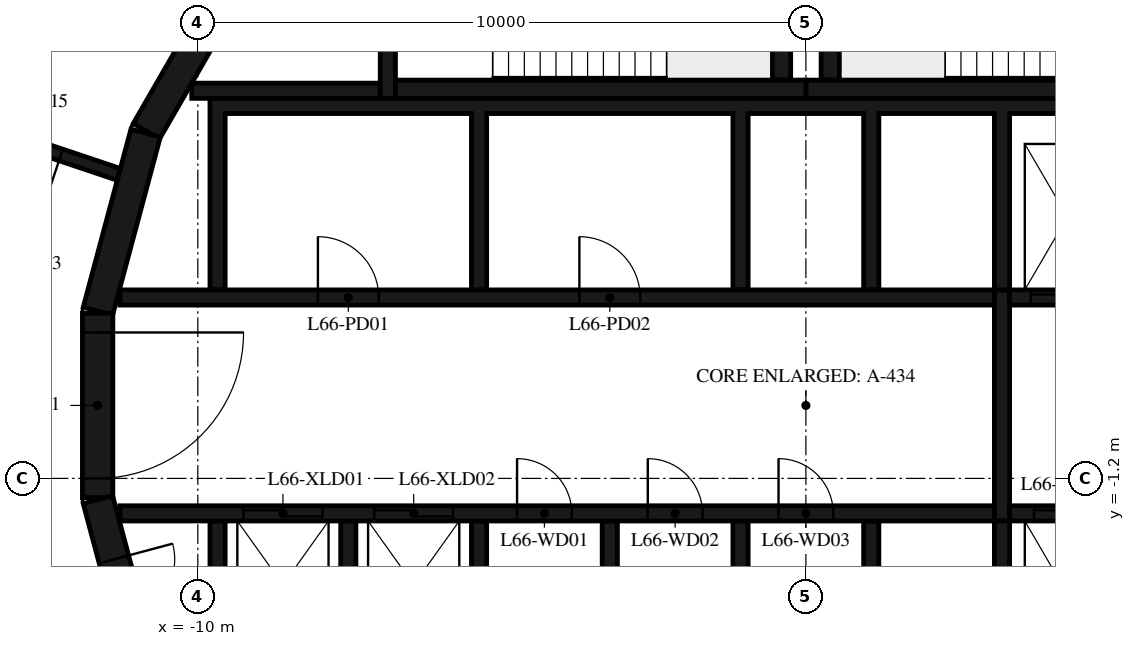
"""IFC4 building model, lengths in metres.
Left out: names, types, materials, properties, quantities, classifications, styles, units other than length and angle.
Written with IfcOpenShell. Run it as: python <this file> out.ifc"""

import sys

from ifc_helpers import new_model, si_unit, direction, frame, frame_2d, origin, place, context, subcontext, project, spatial, polyline, rectangle, outline, extrude, element, fill, save


model = new_model("IFC4")
c1 = context("Model", 3, precision=1e-05, world=origin(), true_north=direction((0.0, 1.0)))
c2 = subcontext(c1, "Body", "Model", "MODEL_VIEW")
j1 = project(units=[si_unit("LENGTHUNIT", "METRE"), si_unit("PLANEANGLEUNIT", "RADIAN")], contexts=[c1])
p1 = place(None, origin())
s1 = spatial("IfcSite", under=j1, at=p1, CompositionType="ELEMENT")
p2 = place(p1, origin())
s2 = spatial("IfcBuilding", under=s1, at=p2, CompositionType="ELEMENT")
p3 = place(p2, frame((0.0, 0.0, 258.2)))
s3 = spatial("IfcBuildingStorey", under=s2, at=p3, CompositionType="ELEMENT", Elevation=258.2)
for number, where, z_axis, x_axis in (
    (1, (-9.329, 7.137, 0.0), (0.0, 0.0, 1.0), (-0.5, -0.866, 0.0)),
    (2, (-10.858, 4.479, 0.0), (0.0, 0.0, 1.0), (-0.259, -0.966, 0.0)),
):
    element("IfcWall", number, at=place(p3, frame(where, z_axis=z_axis, x_axis=x_axis)), inside=s3, PredefinedType="SHEAR", context=c2, shape_type="SweptSolid", body=[
        extrude(rectangle(XDim=3.033, YDim=0.5, at=frame_2d((1.516, 0.0))), origin(), (0.0, 0.0, 1.0), 4.75),
    ])
p4 = place(p3, frame((-11.647, 1.516, 0.0), z_axis=(0.0, 0.0, 1.0), x_axis=(0.0, -1.0, 0.0)))
e3 = element("IfcWall", 3, at=p4, inside=s3, PredefinedType="SHEAR", context=c2, shape_type="SweptSolid", body=[
    extrude(rectangle(XDim=3.033, YDim=0.5, at=frame_2d((1.516, 0.0))), origin(), (0.0, 0.0, 1.0), 4.75),
])
p5 = place(p4, frame((0.316, 0.0, 0.0)))
e4 = element("IfcOpeningElement", 4, at=p5, cuts=e3, PredefinedType="OPENING", context=c2, shape_type="SweptSolid", body=[
    extrude(rectangle(XDim=2.4, YDim=2.1, at=frame_2d((1.2, 1.05))), frame((0.0, 0.26, 0.0), z_axis=(0.0, -1.0, 0.0), x_axis=(1.0, 0.0, 0.0)), (0.0, 0.0, 1.0), 0.52),
])
p6 = place(p3, frame((-11.643, -1.55, 0.0), z_axis=(0.0, 0.0, 1.0), x_axis=(0.258734743916, -0.965948410781, 0.0)))
e5 = element("IfcWall", 5, at=p6, inside=s3, PredefinedType="SHEAR", context=c2, shape_type="SweptSolid", body=[
    extrude(rectangle(XDim=3.033, YDim=0.5, at=frame_2d((1.516, 0.0))), origin(), (0.0, 0.0, 1.0), 4.75),
])
p7 = place(p6, frame((1.016, 0.0, 0.0)))
e6 = element("IfcOpeningElement", 6, at=p7, cuts=e5, PredefinedType="OPENING", context=c2, shape_type="SweptSolid", body=[
    extrude(rectangle(XDim=1.0, YDim=2.4, at=frame_2d((0.5, 1.2))), frame((0.0, 0.26, 0.0), z_axis=(0.0, -1.0, 0.0), x_axis=(1.0, 0.0, 0.0)), (0.0, 0.0, 1.0), 0.52),
])
p8 = place(p3, frame((0.0, 5.2, 0.0), z_axis=(0.0, 0.0, 1.0), x_axis=(1.0, 0.0, 0.0)))
e7 = element("IfcWall", 7, at=p8, inside=s3, PredefinedType="SHEAR", context=c2, shape_type="SweptSolid", body=[
    extrude(rectangle(XDim=6.75, YDim=0.3, at=frame_2d((3.375, 0.0))), origin(), (0.0, 0.0, 1.0), 4.75),
])
p9 = place(p3, frame((0.4, 5.35, 0.0), z_axis=(0.0, 0.0, 1.0), x_axis=(0.0, 1.0, 0.0)))
e8 = element("IfcWall", 8, at=p9, inside=s3, PredefinedType="SHEAR", context=c2, shape_type="SweptSolid", body=[
    extrude(rectangle(XDim=3.32, YDim=0.3, at=frame_2d((1.66, 0.0))), origin(), (0.0, 0.0, 1.0), 4.75),
])
p10 = place(p3, frame((-6.75, 5.2, 0.0), z_axis=(0.0, 0.0, 1.0), x_axis=(1.0, 0.0, 0.0)))
e9 = element("IfcWall", 9, at=p10, inside=s3, PredefinedType="SHEAR", context=c2, shape_type="SweptSolid", body=[
    extrude(rectangle(XDim=6.75, YDim=0.3, at=frame_2d((3.375, 0.0))), origin(), (0.0, 0.0, 1.0), 4.75),
])
p11 = place(p3, frame((-0.4, 5.35, 0.0), z_axis=(0.0, 0.0, 1.0), x_axis=(0.0, 1.0, 0.0)))
e10 = element("IfcWall", 10, at=p11, inside=s3, PredefinedType="SHEAR", context=c2, shape_type="SweptSolid", body=[
    extrude(rectangle(XDim=3.32, YDim=0.3, at=frame_2d((1.66, 0.0))), origin(), (0.0, 0.0, 1.0), 4.75),
])
p12 = place(p3, frame((-6.875, 8.97, 0.0), z_axis=(0.0, 0.0, 1.0), x_axis=(0.0, -1.0, 0.0)))
e11 = element("IfcWall", 11, at=p12, inside=s3, PredefinedType="SHEAR", context=c2, shape_type="SweptSolid", body=[
    extrude(rectangle(XDim=3.92, YDim=0.25, at=frame_2d((1.96, 0.0))), origin(), (0.0, 0.0, 1.0), 4.75),
])
p13 = place(p12, frame((1.61, 0.0, 0.0)))
e12 = element("IfcOpeningElement", 12, at=p13, cuts=e11, PredefinedType="OPENING", context=c2, shape_type="SweptSolid", body=[
    extrude(rectangle(XDim=1.2, YDim=2.1, at=frame_2d((0.6, 1.05))), frame((0.0, 0.135, 0.0), z_axis=(0.0, -1.0, 0.0), x_axis=(1.0, 0.0, 0.0)), (0.0, 0.0, 1.0), 0.27),
])
p14 = place(p3, frame((-7.0, 5.175, 0.0), z_axis=(0.0, 0.0, 1.0), x_axis=(-1.0, 0.0, 0.0)))
e13 = element("IfcWall", 13, at=p14, inside=s3, PredefinedType="SHEAR", context=c2, shape_type="SweptSolid", body=[
    extrude(rectangle(XDim=3.1, YDim=0.25, at=frame_2d((1.55, 0.0))), origin(), (0.0, 0.0, 1.0), 4.75),
])
p15 = place(p3, origin())
e14 = element("IfcWall", 14, at=p15, inside=s3, PredefinedType="SHEAR", context=c2, shape_type="SweptSolid", body=[
    extrude(outline(polyline([(-9.55, 4.8), (-5.5, 4.8), (-5.5, 1.9), (-5.25, 1.9), (-5.25, 4.8), (-1.2, 4.8), (-1.2, 1.9), (-0.95, 1.9), (-0.95, 4.8), (0.95, 4.8), (0.95, 1.9), (1.2, 1.9), (1.2, 4.8), (3.1, 4.8), (3.1, 1.9), (3.35, 1.9), (3.35, 4.8), (5.25, 4.8), (5.25, 1.9), (5.5, 1.9), (5.5, 4.8), (7.4, 4.8), (7.4, 1.9), (7.65, 1.9), (7.65, 4.8), (9.55, 4.8), (9.55, 1.9), (9.8, 1.9), (9.8, 4.8), (9.8, 5.05), (-9.8, 5.05), (-9.8, 4.8), (-9.8, 1.9), (-9.55, 1.9), (-9.55, 4.8)])), origin(), (0.0, 0.0, 1.0), 4.75),
])
p16 = place(p3, origin())
e15 = element("IfcWall", 15, at=p16, inside=s3, PredefinedType="SHEAR", context=c2, shape_type="SweptSolid", body=[
    extrude(outline(polyline([(9.8, -5.05), (9.8, -4.8), (9.8, -1.9), (9.55, -1.9), (9.55, -4.8), (7.65, -4.8), (7.65, -1.9), (7.4, -1.9), (7.4, -4.8), (5.5, -4.8), (5.5, -1.9), (5.25, -1.9), (5.25, -4.8), (3.35, -4.8), (3.35, -1.9), (3.1, -1.9), (3.1, -4.8), (1.2, -4.8), (1.2, -1.9), (0.95, -1.9), (0.95, -4.8), (-0.95, -4.8), (-0.95, -1.9), (-1.2, -1.9), (-1.2, -4.8), (-3.1, -4.8), (-3.1, -1.9), (-3.35, -1.9), (-3.35, -4.8), (-5.25, -4.8), (-5.25, -1.9), (-5.5, -1.9), (-5.5, -4.8), (-7.4, -4.8), (-7.4, -1.9), (-7.65, -1.9), (-7.65, -4.8), (-9.55, -4.8), (-9.55, -1.9), (-9.8, -1.9), (-9.8, -4.8), (-9.8, -5.05), (9.8, -5.05)])), origin(), (0.0, 0.0, 1.0), 4.75),
])
p17 = place(p3, frame((-11.28, 1.775, 0.0), z_axis=(0.0, 0.0, 1.0), x_axis=(1.0, 0.0, 0.0)))
e16 = element("IfcWall", 16, at=p17, inside=s3, PredefinedType="SHEAR", context=c2, shape_type="SweptSolid", body=[
    extrude(rectangle(XDim=14.38, YDim=0.25, at=frame_2d((7.19, 0.0))), origin(), (0.0, 0.0, 1.0), 4.75),
])
p18 = place(p17, frame((3.255, 0.0, 0.0)))
e17 = element("IfcOpeningElement", 17, at=p18, cuts=e16, PredefinedType="OPENING", context=c2, shape_type="SweptSolid", body=[
    extrude(rectangle(XDim=1.0, YDim=2.4, at=frame_2d((0.5, 1.2))), frame((0.0, 0.135, 0.0), z_axis=(0.0, -1.0, 0.0), x_axis=(1.0, 0.0, 0.0)), (0.0, 0.0, 1.0), 0.27),
])
p19 = place(p17, frame((7.555, 0.0, 0.0)))
e18 = element("IfcOpeningElement", 18, at=p19, cuts=e16, PredefinedType="OPENING", context=c2, shape_type="SweptSolid", body=[
    extrude(rectangle(XDim=1.0, YDim=2.4, at=frame_2d((0.5, 1.2))), frame((0.0, 0.135, 0.0), z_axis=(0.0, -1.0, 0.0), x_axis=(1.0, 0.0, 0.0)), (0.0, 0.0, 1.0), 0.27),
])
p20 = place(p3, frame((3.35, 1.775, 0.0), z_axis=(0.0, 0.0, 1.0), x_axis=(1.0, 0.0, 0.0)))
e19 = element("IfcWall", 19, at=p20, inside=s3, PredefinedType="SHEAR", context=c2, shape_type="SweptSolid", body=[
    extrude(rectangle(XDim=7.93, YDim=0.25, at=frame_2d((3.965, 0.0))), origin(), (0.0, 0.0, 1.0), 4.75),
])
p21 = place(p20, frame((0.35, 0.0, 0.0)))
e20 = element("IfcOpeningElement", 20, at=p21, cuts=e19, PredefinedType="OPENING", context=c2, shape_type="SweptSolid", body=[
    extrude(rectangle(XDim=1.2, YDim=2.4, at=frame_2d((0.6, 1.2))), frame((0.0, 0.135, 0.0), z_axis=(0.0, -1.0, 0.0), x_axis=(1.0, 0.0, 0.0)), (0.0, 0.0, 1.0), 0.27),
])
p22 = place(p20, frame((2.5, 0.0, 0.0)))
e21 = element("IfcOpeningElement", 21, at=p22, cuts=e19, PredefinedType="OPENING", context=c2, shape_type="SweptSolid", body=[
    extrude(rectangle(XDim=1.2, YDim=2.4, at=frame_2d((0.6, 1.2))), frame((0.0, 0.135, 0.0), z_axis=(0.0, -1.0, 0.0), x_axis=(1.0, 0.0, 0.0)), (0.0, 0.0, 1.0), 0.27),
])
p23 = place(p20, frame((4.75, 0.0, 0.0)))
e22 = element("IfcOpeningElement", 22, at=p23, cuts=e19, PredefinedType="OPENING", context=c2, shape_type="SweptSolid", body=[
    extrude(rectangle(XDim=1.0, YDim=2.4, at=frame_2d((0.5, 1.2))), frame((0.0, 0.135, 0.0), z_axis=(0.0, -1.0, 0.0), x_axis=(1.0, 0.0, 0.0)), (0.0, 0.0, 1.0), 0.27),
])
p24 = place(p3, frame((-11.28, -1.775, 0.0), z_axis=(0.0, 0.0, 1.0), x_axis=(1.0, 0.0, 0.0)))
e23 = element("IfcWall", 23, at=p24, inside=s3, PredefinedType="SHEAR", context=c2, shape_type="SweptSolid", body=[
    extrude(rectangle(XDim=14.38, YDim=0.25, at=frame_2d((7.19, 0.0))), origin(), (0.0, 0.0, 1.0), 4.75),
])
p25 = place(p24, frame((2.03, 0.0, 0.0)))
e24 = element("IfcOpeningElement", 24, at=p25, cuts=e23, PredefinedType="OPENING", context=c2, shape_type="SweptSolid", body=[
    extrude(rectangle(XDim=1.3, YDim=2.1, at=frame_2d((0.65, 1.05))), frame((0.0, 0.135, 0.0), z_axis=(0.0, -1.0, 0.0), x_axis=(1.0, 0.0, 0.0)), (0.0, 0.0, 1.0), 0.27),
])
p26 = place(p24, frame((4.18, 0.0, 0.0)))
e25 = element("IfcOpeningElement", 25, at=p26, cuts=e23, PredefinedType="OPENING", context=c2, shape_type="SweptSolid", body=[
    extrude(rectangle(XDim=1.3, YDim=2.1, at=frame_2d((0.65, 1.05))), frame((0.0, 0.135, 0.0), z_axis=(0.0, -1.0, 0.0), x_axis=(1.0, 0.0, 0.0)), (0.0, 0.0, 1.0), 0.27),
])
p27 = place(p24, frame((6.53, 0.0, 0.0)))
e26 = element("IfcOpeningElement", 26, at=p27, cuts=e23, PredefinedType="OPENING", context=c2, shape_type="SweptSolid", body=[
    extrude(rectangle(XDim=0.9, YDim=2.1, at=frame_2d((0.45, 1.05))), frame((0.0, 0.135, 0.0), z_axis=(0.0, -1.0, 0.0), x_axis=(1.0, 0.0, 0.0)), (0.0, 0.0, 1.0), 0.27),
])
p28 = place(p24, frame((8.68, 0.0, 0.0)))
e27 = element("IfcOpeningElement", 27, at=p28, cuts=e23, PredefinedType="OPENING", context=c2, shape_type="SweptSolid", body=[
    extrude(rectangle(XDim=0.9, YDim=2.1, at=frame_2d((0.45, 1.05))), frame((0.0, 0.135, 0.0), z_axis=(0.0, -1.0, 0.0), x_axis=(1.0, 0.0, 0.0)), (0.0, 0.0, 1.0), 0.27),
])
p29 = place(p24, frame((10.83, 0.0, 0.0)))
e28 = element("IfcOpeningElement", 28, at=p29, cuts=e23, PredefinedType="OPENING", context=c2, shape_type="SweptSolid", body=[
    extrude(rectangle(XDim=0.9, YDim=2.1, at=frame_2d((0.45, 1.05))), frame((0.0, 0.135, 0.0), z_axis=(0.0, -1.0, 0.0), x_axis=(1.0, 0.0, 0.0)), (0.0, 0.0, 1.0), 0.27),
])
p30 = place(p3, frame((3.35, -1.775, 0.0), z_axis=(0.0, 0.0, 1.0), x_axis=(1.0, 0.0, 0.0)))
e29 = element("IfcWall", 29, at=p30, inside=s3, PredefinedType="SHEAR", context=c2, shape_type="SweptSolid", body=[
    extrude(rectangle(XDim=7.93, YDim=0.25, at=frame_2d((3.965, 0.0))), origin(), (0.0, 0.0, 1.0), 4.75),
])
p31 = place(p30, frame((0.4, 0.0, 0.0)))
e30 = element("IfcOpeningElement", 30, at=p31, cuts=e29, PredefinedType="OPENING", context=c2, shape_type="SweptSolid", body=[
    extrude(rectangle(XDim=1.1, YDim=2.4, at=frame_2d((0.55, 1.2))), frame((0.0, 0.135, 0.0), z_axis=(0.0, -1.0, 0.0), x_axis=(1.0, 0.0, 0.0)), (0.0, 0.0, 1.0), 0.27),
])
p32 = place(p30, frame((2.55, 0.0, 0.0)))
e31 = element("IfcOpeningElement", 31, at=p32, cuts=e29, PredefinedType="OPENING", context=c2, shape_type="SweptSolid", body=[
    extrude(rectangle(XDim=1.1, YDim=2.4, at=frame_2d((0.55, 1.2))), frame((0.0, 0.135, 0.0), z_axis=(0.0, -1.0, 0.0), x_axis=(1.0, 0.0, 0.0)), (0.0, 0.0, 1.0), 0.27),
])
p33 = place(p30, frame((4.7, 0.0, 0.0)))
e32 = element("IfcOpeningElement", 32, at=p33, cuts=e29, PredefinedType="OPENING", context=c2, shape_type="SweptSolid", body=[
    extrude(rectangle(XDim=1.1, YDim=2.4, at=frame_2d((0.55, 1.2))), frame((0.0, 0.135, 0.0), z_axis=(0.0, -1.0, 0.0), x_axis=(1.0, 0.0, 0.0)), (0.0, 0.0, 1.0), 0.27),
])
p34 = place(p3, frame((3.225, -1.9, 0.0), z_axis=(0.0, 0.0, 1.0), x_axis=(0.0, 1.0, 0.0)))
e33 = element("IfcWall", 33, at=p34, inside=s3, PredefinedType="SHEAR", context=c2, shape_type="SweptSolid", body=[
    extrude(rectangle(XDim=3.8, YDim=0.25, at=frame_2d((1.9, 0.0))), origin(), (0.0, 0.0, 1.0), 4.75),
])
p35 = place(p3, frame((-11.3, 3.8, 0.0), z_axis=(0.0, 0.0, 1.0), x_axis=(-0.94805712629, 0.318100118345, 0.0)))
e34 = element("IfcWall", 34, at=p35, inside=s3, PredefinedType="PARTITIONING", context=c2, shape_type="SweptSolid", body=[
    extrude(rectangle(XDim=3.207, YDim=0.2, at=frame_2d((1.603, 0.0))), origin(), (0.0, 0.0, 1.0), 4.75),
])
p36 = place(p35, frame((1.003, 0.0, 0.0)))
e35 = element("IfcOpeningElement", 35, at=p36, cuts=e34, PredefinedType="OPENING", context=c2, shape_type="SweptSolid", body=[
    extrude(rectangle(XDim=1.2, YDim=2.1, at=frame_2d((0.6, 1.05))), frame((0.0, 0.11, 0.0), z_axis=(0.0, -1.0, 0.0), x_axis=(1.0, 0.0, 0.0)), (0.0, 0.0, 1.0), 0.22),
])
p37 = place(p5, origin())
e36 = element("IfcDoor", 36, at=p37, inside=s3, OperationType="DOUBLE_DOOR_SINGLE_SWING", PredefinedType="DOOR", context=c2, shape_type="SweptSolid", body=[
    extrude(rectangle(XDim=2.4, YDim=2.1, at=frame_2d((1.2, 1.05))), frame((0.0, 0.025, 0.0), z_axis=(0.0, -1.0, 0.0), x_axis=(1.0, 0.0, 0.0)), (0.0, 0.0, 1.0), 0.05),
])
fill(e4, e36)
p38 = place(p21, origin())
e37 = element("IfcDoor", 37, at=p38, inside=s3, OperationType="DOUBLE_DOOR_SLIDING", PredefinedType="DOOR", context=c2, shape_type="SweptSolid", body=[
    extrude(rectangle(XDim=1.2, YDim=2.4, at=frame_2d((0.6, 1.2))), frame((0.0, 0.025, 0.0), z_axis=(0.0, -1.0, 0.0), x_axis=(1.0, 0.0, 0.0)), (0.0, 0.0, 1.0), 0.05),
])
fill(e20, e37)
p39 = place(p25, origin())
e38 = element("IfcDoor", 38, at=p39, inside=s3, OperationType="DOUBLE_DOOR_SLIDING", PredefinedType="DOOR", context=c2, shape_type="SweptSolid", body=[
    extrude(rectangle(XDim=1.3, YDim=2.1, at=frame_2d((0.65, 1.05))), frame((0.0, 0.025, 0.0), z_axis=(0.0, -1.0, 0.0), x_axis=(1.0, 0.0, 0.0)), (0.0, 0.0, 1.0), 0.05),
])
fill(e24, e38)
p40 = place(p26, origin())
e39 = element("IfcDoor", 39, at=p40, inside=s3, OperationType="DOUBLE_DOOR_SLIDING", PredefinedType="DOOR", context=c2, shape_type="SweptSolid", body=[
    extrude(rectangle(XDim=1.3, YDim=2.1, at=frame_2d((0.65, 1.05))), frame((0.0, 0.025, 0.0), z_axis=(0.0, -1.0, 0.0), x_axis=(1.0, 0.0, 0.0)), (0.0, 0.0, 1.0), 0.05),
])
fill(e25, e39)
p41 = place(p31, origin())
e40 = element("IfcDoor", 40, at=p41, inside=s3, OperationType="DOUBLE_DOOR_SLIDING", PredefinedType="DOOR", context=c2, shape_type="SweptSolid", body=[
    extrude(rectangle(XDim=1.1, YDim=2.4, at=frame_2d((0.55, 1.2))), frame((0.0, 0.025, 0.0), z_axis=(0.0, -1.0, 0.0), x_axis=(1.0, 0.0, 0.0)), (0.0, 0.0, 1.0), 0.05),
])
fill(e30, e40)
p42 = place(p18, origin())
e41 = element("IfcDoor", 41, at=p42, inside=s3, OperationType="SINGLE_SWING_RIGHT", PredefinedType="DOOR", context=c2, shape_type="SweptSolid", body=[
    extrude(rectangle(XDim=1.0, YDim=2.4, at=frame_2d((0.5, 1.2))), frame((0.0, 0.025, 0.0), z_axis=(0.0, -1.0, 0.0), x_axis=(1.0, 0.0, 0.0)), (0.0, 0.0, 1.0), 0.05),
])
fill(e17, e41)
p43 = place(p19, origin())
e42 = element("IfcDoor", 42, at=p43, inside=s3, OperationType="SINGLE_SWING_LEFT", PredefinedType="DOOR", context=c2, shape_type="SweptSolid", body=[
    extrude(rectangle(XDim=1.0, YDim=2.4, at=frame_2d((0.5, 1.2))), frame((0.0, 0.025, 0.0), z_axis=(0.0, -1.0, 0.0), x_axis=(1.0, 0.0, 0.0)), (0.0, 0.0, 1.0), 0.05),
])
fill(e18, e42)
p44 = place(p27, origin())
e43 = element("IfcDoor", 43, at=p44, inside=s3, OperationType="SINGLE_SWING_LEFT", PredefinedType="DOOR", context=c2, shape_type="SweptSolid", body=[
    extrude(rectangle(XDim=0.9, YDim=2.1, at=frame_2d((0.45, 1.05))), frame((0.0, 0.025, 0.0), z_axis=(0.0, -1.0, 0.0), x_axis=(1.0, 0.0, 0.0)), (0.0, 0.0, 1.0), 0.05),
])
fill(e26, e43)
p45 = place(p28, origin())
e44 = element("IfcDoor", 44, at=p45, inside=s3, OperationType="SINGLE_SWING_RIGHT", PredefinedType="DOOR", context=c2, shape_type="SweptSolid", body=[
    extrude(rectangle(XDim=0.9, YDim=2.1, at=frame_2d((0.45, 1.05))), frame((0.0, 0.025, 0.0), z_axis=(0.0, -1.0, 0.0), x_axis=(1.0, 0.0, 0.0)), (0.0, 0.0, 1.0), 0.05),
])
fill(e27, e44)
p46 = place(p29, origin())
e45 = element("IfcDoor", 45, at=p46, inside=s3, OperationType="SINGLE_SWING_LEFT", PredefinedType="DOOR", context=c2, shape_type="SweptSolid", body=[
    extrude(rectangle(XDim=0.9, YDim=2.1, at=frame_2d((0.45, 1.05))), frame((0.0, 0.025, 0.0), z_axis=(0.0, -1.0, 0.0), x_axis=(1.0, 0.0, 0.0)), (0.0, 0.0, 1.0), 0.05),
])
fill(e28, e45)
p47 = place(p7, origin())
e46 = element("IfcDoor", 46, at=p47, inside=s3, OperationType="SINGLE_SWING_RIGHT", PredefinedType="DOOR", context=c2, shape_type="SweptSolid", body=[
    extrude(rectangle(XDim=1.0, YDim=2.4, at=frame_2d((0.5, 1.2))), frame((0.0, 0.025, 0.0), z_axis=(0.0, -1.0, 0.0), x_axis=(1.0, 0.0, 0.0)), (0.0, 0.0, 1.0), 0.05),
])
fill(e6, e46)
p48 = place(p36, origin())
e47 = element("IfcDoor", 47, at=p48, inside=s3, OperationType="SINGLE_SWING_LEFT", PredefinedType="DOOR", context=c2, shape_type="SweptSolid", body=[
    extrude(rectangle(XDim=1.2, YDim=2.1, at=frame_2d((0.6, 1.05))), frame((0.0, 0.025, 0.0), z_axis=(0.0, -1.0, 0.0), x_axis=(1.0, 0.0, 0.0)), (0.0, 0.0, 1.0), 0.05),
])
fill(e35, e47)
save(model, sys.argv[1])
